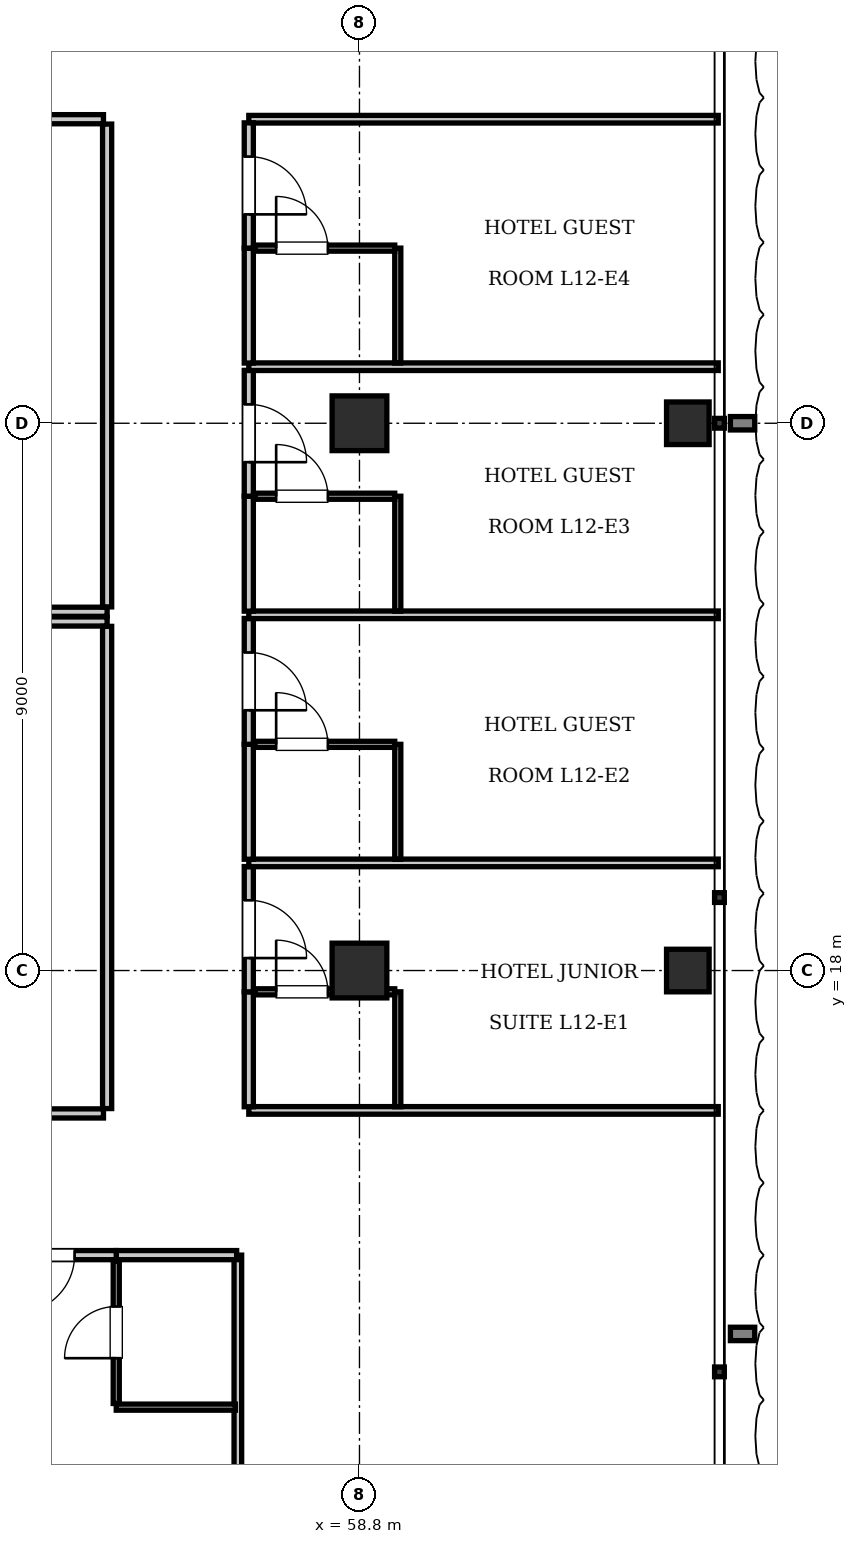
"""IFC4 building model, lengths in metres.
Left out: names, types, materials, properties, quantities, classifications, styles, units other than length and angle.
Written with IfcOpenShell. Run it as: python <this file> out.ifc"""

import sys

from ifc_helpers import new_model, si_unit, direction, frame, frame_2d, origin, origin_2d, place, context, subcontext, project, spatial, rectangle, i_section, extrude, element, fill, save


model = new_model("IFC4")
c1 = context("Model", 3, precision=1e-05, world=origin(), true_north=direction((0.0, 1.0)))
c2 = subcontext(c1, "Body", "Model", "MODEL_VIEW")
j1 = project(units=[si_unit("LENGTHUNIT", "METRE"), si_unit("PLANEANGLEUNIT", "RADIAN")], contexts=[c1])
p1 = place(None, origin())
s1 = spatial("IfcSite", under=j1, at=p1, CompositionType="ELEMENT")
p2 = place(p1, origin())
s2 = spatial("IfcBuilding", under=s1, at=p2, CompositionType="ELEMENT")
p3 = place(p2, frame((0.0, 0.0, 53.9)))
s3 = spatial("IfcBuildingStorey", under=s2, at=p3, CompositionType="ELEMENT", Elevation=53.9)
for number, where, z_axis, x_axis in (
    (1, (58.8, 18.0, 0.0), (0.0, 0.0, 1.0), (1.0, 0.0, 0.0)),
    (2, (58.8, 27.0, 0.0), (0.0, 0.0, 1.0), (1.0, 0.0, 0.0)),
):
    element("IfcColumn", number, at=place(p3, frame(where, z_axis=z_axis, x_axis=x_axis)), inside=s3, PredefinedType="COLUMN", context=c2, shape_type="SweptSolid", body=[
        extrude(rectangle(XDim=0.9, YDim=0.9, at=origin_2d()), origin(), (0.0, 0.0, 1.0), 3.85),
    ])
for number, where, z_axis, x_axis in (
    (3, (64.2, 18.0, 0.0), (0.0, 0.0, 1.0), (1.0, 0.0, 0.0)),
    (4, (64.2, 27.0, 0.0), (0.0, 0.0, 1.0), (1.0, 0.0, 0.0)),
):
    element("IfcColumn", number, at=place(p3, frame(where, z_axis=z_axis, x_axis=x_axis)), inside=s3, PredefinedType="COLUMN", context=c2, shape_type="SweptSolid", body=[
        extrude(i_section(OverallWidth=0.7, OverallDepth=0.7, WebThickness=0.028, FlangeThickness=0.044, at=origin_2d()), origin(), (0.0, 0.0, 1.0), 3.85),
    ])
p4 = place(p3, frame((20.95, 23.9, 0.0), z_axis=(0.0, 0.0, 1.0), x_axis=(1.0, 0.0, 0.0)))
e5 = element("IfcWall", 5, at=p4, inside=s3, PredefinedType="PARTITIONING", context=c2, shape_type="SweptSolid", body=[
    extrude(rectangle(XDim=33.7, YDim=0.15, at=frame_2d((16.85, 0.0))), origin(), (0.0, 0.0, 1.0), 3.61),
])
p5 = place(p3, frame((54.65, 23.98, 0.0), z_axis=(0.0, 0.0, 1.0), x_axis=(0.0, 1.0, 0.0)))
e6 = element("IfcWall", 6, at=p5, inside=s3, PredefinedType="PARTITIONING", context=c2, shape_type="SweptSolid", body=[
    extrude(rectangle(XDim=7.94, YDim=0.15, at=frame_2d((3.97, 0.0))), origin(), (0.0, 0.0, 1.0), 3.255),
])
p6 = place(p3, frame((43.222, 32.0, 0.0), z_axis=(0.0, 0.0, 1.0), x_axis=(1.0, 0.0, 0.0)))
e7 = element("IfcWall", 7, at=p6, inside=s3, PredefinedType="PARTITIONING", context=c2, shape_type="SweptSolid", body=[
    extrude(rectangle(XDim=11.368, YDim=0.15, at=frame_2d((5.684, 0.0))), origin(), (0.0, 0.0, 1.0), 3.61),
])
p7 = place(p6, frame((5.234, 0.0, 0.0)))
e8 = element("IfcOpeningElement", 8, at=p7, cuts=e7, PredefinedType="OPENING", context=c2, shape_type="SweptSolid", body=[
    extrude(rectangle(XDim=0.9, YDim=2.1, at=frame_2d((0.45, 1.05))), frame((0.0, 0.085, 0.0), z_axis=(0.0, -1.0, 0.0), x_axis=(1.0, 0.0, 0.0)), (0.0, 0.0, 1.0), 0.17),
])
p8 = place(p3, frame((20.95, 23.74, 0.0), z_axis=(0.0, 0.0, 1.0), x_axis=(1.0, 0.0, 0.0)))
e9 = element("IfcWall", 9, at=p8, inside=s3, PredefinedType="PARTITIONING", context=c2, shape_type="SweptSolid", body=[
    extrude(rectangle(XDim=33.7, YDim=0.15, at=frame_2d((16.85, 0.0))), origin(), (0.0, 0.0, 1.0), 3.61),
])
p9 = place(p3, frame((54.65, 15.73, 0.0), z_axis=(0.0, 0.0, 1.0), x_axis=(0.0, 1.0, 0.0)))
e10 = element("IfcWall", 10, at=p9, inside=s3, PredefinedType="PARTITIONING", context=c2, shape_type="SweptSolid", body=[
    extrude(rectangle(XDim=7.93, YDim=0.15, at=frame_2d((3.965, 0.0))), origin(), (0.0, 0.0, 1.0), 3.207),
])
p10 = place(p3, frame((40.189, 15.65, 0.0), z_axis=(0.0, 0.0, 1.0), x_axis=(1.0, 0.0, 0.0)))
e11 = element("IfcWall", 11, at=p10, inside=s3, PredefinedType="PARTITIONING", context=c2, shape_type="SweptSolid", body=[
    extrude(rectangle(XDim=14.401, YDim=0.15, at=frame_2d((7.201, 0.0))), origin(), (0.0, 0.0, 1.0), 3.61),
])
p11 = place(p10, frame((6.75, 0.0, 0.0)))
e12 = element("IfcOpeningElement", 12, at=p11, cuts=e11, PredefinedType="OPENING", context=c2, shape_type="SweptSolid", body=[
    extrude(rectangle(XDim=0.9, YDim=2.1, at=frame_2d((0.45, 1.05))), frame((0.0, 0.085, 0.0), z_axis=(0.0, -1.0, 0.0), x_axis=(1.0, 0.0, 0.0)), (0.0, 0.0, 1.0), 0.17),
])
p12 = place(p3, frame((56.8, 0.1, 0.0), z_axis=(0.0, 0.0, 1.0), x_axis=(0.0, 1.0, 0.0)))
e13 = element("IfcWall", 13, at=p12, inside=s3, PredefinedType="PARTITIONING", context=c2, shape_type="SweptSolid", body=[
    extrude(rectangle(XDim=13.22, YDim=0.125, at=frame_2d((6.61, 0.0))), origin(), (0.0, 0.0, 1.0), 3.61),
])
p13 = place(p3, frame((54.8, 13.32, 0.0), z_axis=(0.0, 0.0, 1.0), x_axis=(1.0, 0.0, 0.0)))
e14 = element("IfcWall", 14, at=p13, inside=s3, PredefinedType="PARTITIONING", context=c2, shape_type="SweptSolid", body=[
    extrude(rectangle(XDim=1.98, YDim=0.15, at=frame_2d((0.99, 0.0))), origin(), (0.0, 0.0, 1.0), 3.61),
])
p14 = place(p3, frame((54.8, 10.82, 0.0), z_axis=(0.0, 0.0, 1.0), x_axis=(1.0, 0.0, 0.0)))
e15 = element("IfcWall", 15, at=p14, inside=s3, PredefinedType="PARTITIONING", context=c2, shape_type="SweptSolid", body=[
    extrude(rectangle(XDim=1.96, YDim=0.1, at=frame_2d((0.98, 0.0))), origin(), (0.0, 0.0, 1.0), 3.61),
])
p15 = place(p3, frame((54.8, 10.88, 0.0), z_axis=(0.0, 0.0, 1.0), x_axis=(0.0, 1.0, 0.0)))
e16 = element("IfcWall", 16, at=p15, inside=s3, PredefinedType="PARTITIONING", context=c2, shape_type="SweptSolid", body=[
    extrude(rectangle(XDim=2.34, YDim=0.1, at=frame_2d((1.17, 0.0))), origin(), (0.0, 0.0, 1.0), 3.61),
])
p16 = place(p15, frame((0.745, 0.0, 0.0)))
e17 = element("IfcOpeningElement", 17, at=p16, cuts=e16, PredefinedType="OPENING", context=c2, shape_type="SweptSolid", body=[
    extrude(rectangle(XDim=0.85, YDim=2.1, at=frame_2d((0.425, 1.05))), frame((0.0, 0.06, 0.0), z_axis=(0.0, -1.0, 0.0), x_axis=(1.0, 0.0, 0.0)), (0.0, 0.0, 1.0), 0.12),
])
p17 = place(p3, frame((52.48, 13.32, 0.0), z_axis=(0.0, 0.0, 1.0), x_axis=(1.0, 0.0, 0.0)))
e18 = element("IfcWall", 18, at=p17, inside=s3, PredefinedType="PARTITIONING", context=c2, shape_type="SweptSolid", body=[
    extrude(rectangle(XDim=2.32, YDim=0.15, at=frame_2d((1.16, 0.0))), origin(), (0.0, 0.0, 1.0), 3.61),
])
p18 = place(p17, frame((0.685, 0.0, 0.0)))
e19 = element("IfcOpeningElement", 19, at=p18, cuts=e18, PredefinedType="OPENING", context=c2, shape_type="SweptSolid", body=[
    extrude(rectangle(XDim=0.95, YDim=2.15, at=frame_2d((0.475, 1.075))), frame((0.0, 0.085, 0.0), z_axis=(0.0, -1.0, 0.0), x_axis=(1.0, 0.0, 0.0)), (0.0, 0.0, 1.0), 0.17),
])
for number, where, z_axis, x_axis in (
    (20, (56.98, 15.7, 0.0), (0.0, 0.0, 1.0), (1.0, 0.0, 0.0)),
    (21, (56.98, 32.0, 0.0), (0.0, 0.0, 1.0), (1.0, 0.0, 0.0)),
):
    element("IfcWall", number, at=place(p3, frame(where, z_axis=z_axis, x_axis=x_axis)), inside=s3, PredefinedType="PARTITIONING", context=c2, shape_type="SweptSolid", body=[
        extrude(rectangle(XDim=7.72, YDim=0.125, at=frame_2d((3.86, 0.0))), origin(), (0.0, 0.0, 1.0), 3.61),
    ])
p19 = place(p3, frame((56.98, 15.76, 0.0), z_axis=(0.0, 0.0, 1.0), x_axis=(0.0, 1.0, 0.0)))
e22 = element("IfcWall", 22, at=p19, inside=s3, PredefinedType="PARTITIONING", context=c2, shape_type="SweptSolid", body=[
    extrude(rectangle(XDim=1.89, YDim=0.15, at=frame_2d((0.945, 0.0))), origin(), (0.0, 0.0, 1.0), 3.61),
])
p20 = place(p3, frame((56.98, 17.65, 0.0), z_axis=(0.0, 0.0, 1.0), x_axis=(0.0, 1.0, 0.0)))
e23 = element("IfcWall", 23, at=p20, inside=s3, PredefinedType="PARTITIONING", context=c2, shape_type="SweptSolid", body=[
    extrude(rectangle(XDim=2.06, YDim=0.15, at=frame_2d((1.03, 0.0))), origin(), (0.0, 0.0, 1.0), 3.61),
])
p21 = place(p20, frame((0.555, 0.0, 0.0)))
e24 = element("IfcOpeningElement", 24, at=p21, cuts=e23, PredefinedType="OPENING", context=c2, shape_type="SweptSolid", body=[
    extrude(rectangle(XDim=0.95, YDim=2.15, at=frame_2d((0.475, 1.075))), frame((0.0, 0.085, 0.0), z_axis=(0.0, -1.0, 0.0), x_axis=(1.0, 0.0, 0.0)), (0.0, 0.0, 1.0), 0.17),
])
p22 = place(p3, frame((59.43, 15.76, 0.0), z_axis=(0.0, 0.0, 1.0), x_axis=(0.0, 1.0, 0.0)))
e25 = element("IfcWall", 25, at=p22, inside=s3, PredefinedType="PARTITIONING", context=c2, shape_type="SweptSolid", body=[
    extrude(rectangle(XDim=1.89, YDim=0.1, at=frame_2d((0.945, 0.0))), origin(), (0.0, 0.0, 1.0), 3.61),
])
p23 = place(p3, frame((57.08, 17.65, 0.0), z_axis=(0.0, 0.0, 1.0), x_axis=(1.0, 0.0, 0.0)))
e26 = element("IfcWall", 26, at=p23, inside=s3, PredefinedType="PARTITIONING", context=c2, shape_type="SweptSolid", body=[
    extrude(rectangle(XDim=2.3, YDim=0.1, at=frame_2d((1.15, 0.0))), origin(), (0.0, 0.0, 1.0), 3.61),
])
p24 = place(p23, frame((0.35, 0.0, 0.0)))
e27 = element("IfcOpeningElement", 27, at=p24, cuts=e26, PredefinedType="OPENING", context=c2, shape_type="SweptSolid", body=[
    extrude(rectangle(XDim=0.85, YDim=2.1, at=frame_2d((0.425, 1.05))), frame((0.0, 0.06, 0.0), z_axis=(0.0, -1.0, 0.0), x_axis=(1.0, 0.0, 0.0)), (0.0, 0.0, 1.0), 0.12),
])
p25 = place(p3, frame((56.98, 19.77, 0.0), z_axis=(0.0, 0.0, 1.0), x_axis=(1.0, 0.0, 0.0)))
e28 = element("IfcWall", 28, at=p25, inside=s3, PredefinedType="PARTITIONING", context=c2, shape_type="SweptSolid", body=[
    extrude(rectangle(XDim=7.72, YDim=0.125, at=frame_2d((3.86, 0.0))), origin(), (0.0, 0.0, 1.0), 3.61),
])
p26 = place(p3, frame((56.98, 19.83, 0.0), z_axis=(0.0, 0.0, 1.0), x_axis=(0.0, 1.0, 0.0)))
e29 = element("IfcWall", 29, at=p26, inside=s3, PredefinedType="PARTITIONING", context=c2, shape_type="SweptSolid", body=[
    extrude(rectangle(XDim=1.89, YDim=0.15, at=frame_2d((0.945, 0.0))), origin(), (0.0, 0.0, 1.0), 3.61),
])
p27 = place(p3, frame((56.98, 21.72, 0.0), z_axis=(0.0, 0.0, 1.0), x_axis=(0.0, 1.0, 0.0)))
e30 = element("IfcWall", 30, at=p27, inside=s3, PredefinedType="PARTITIONING", context=c2, shape_type="SweptSolid", body=[
    extrude(rectangle(XDim=2.07, YDim=0.15, at=frame_2d((1.035, 0.0))), origin(), (0.0, 0.0, 1.0), 3.61),
])
p28 = place(p27, frame((0.56, 0.0, 0.0)))
e31 = element("IfcOpeningElement", 31, at=p28, cuts=e30, PredefinedType="OPENING", context=c2, shape_type="SweptSolid", body=[
    extrude(rectangle(XDim=0.95, YDim=2.15, at=frame_2d((0.475, 1.075))), frame((0.0, 0.085, 0.0), z_axis=(0.0, -1.0, 0.0), x_axis=(1.0, 0.0, 0.0)), (0.0, 0.0, 1.0), 0.17),
])
p29 = place(p3, frame((59.43, 19.83, 0.0), z_axis=(0.0, 0.0, 1.0), x_axis=(0.0, 1.0, 0.0)))
e32 = element("IfcWall", 32, at=p29, inside=s3, PredefinedType="PARTITIONING", context=c2, shape_type="SweptSolid", body=[
    extrude(rectangle(XDim=1.89, YDim=0.1, at=frame_2d((0.945, 0.0))), origin(), (0.0, 0.0, 1.0), 3.61),
])
p30 = place(p3, frame((57.08, 21.72, 0.0), z_axis=(0.0, 0.0, 1.0), x_axis=(1.0, 0.0, 0.0)))
e33 = element("IfcWall", 33, at=p30, inside=s3, PredefinedType="PARTITIONING", context=c2, shape_type="SweptSolid", body=[
    extrude(rectangle(XDim=2.3, YDim=0.1, at=frame_2d((1.15, 0.0))), origin(), (0.0, 0.0, 1.0), 3.61),
])
p31 = place(p30, frame((0.35, 0.0, 0.0)))
e34 = element("IfcOpeningElement", 34, at=p31, cuts=e33, PredefinedType="OPENING", context=c2, shape_type="SweptSolid", body=[
    extrude(rectangle(XDim=0.85, YDim=2.1, at=frame_2d((0.425, 1.05))), frame((0.0, 0.06, 0.0), z_axis=(0.0, -1.0, 0.0), x_axis=(1.0, 0.0, 0.0)), (0.0, 0.0, 1.0), 0.12),
])
p32 = place(p3, frame((56.98, 23.85, 0.0), z_axis=(0.0, 0.0, 1.0), x_axis=(1.0, 0.0, 0.0)))
e35 = element("IfcWall", 35, at=p32, inside=s3, PredefinedType="PARTITIONING", context=c2, shape_type="SweptSolid", body=[
    extrude(rectangle(XDim=7.72, YDim=0.125, at=frame_2d((3.86, 0.0))), origin(), (0.0, 0.0, 1.0), 3.61),
])
p33 = place(p3, frame((56.98, 23.91, 0.0), z_axis=(0.0, 0.0, 1.0), x_axis=(0.0, 1.0, 0.0)))
e36 = element("IfcWall", 36, at=p33, inside=s3, PredefinedType="PARTITIONING", context=c2, shape_type="SweptSolid", body=[
    extrude(rectangle(XDim=1.89, YDim=0.15, at=frame_2d((0.945, 0.0))), origin(), (0.0, 0.0, 1.0), 3.61),
])
p34 = place(p3, frame((56.98, 25.8, 0.0), z_axis=(0.0, 0.0, 1.0), x_axis=(0.0, 1.0, 0.0)))
e37 = element("IfcWall", 37, at=p34, inside=s3, PredefinedType="PARTITIONING", context=c2, shape_type="SweptSolid", body=[
    extrude(rectangle(XDim=2.07, YDim=0.15, at=frame_2d((1.035, 0.0))), origin(), (0.0, 0.0, 1.0), 3.61),
])
p35 = place(p34, frame((0.56, 0.0, 0.0)))
e38 = element("IfcOpeningElement", 38, at=p35, cuts=e37, PredefinedType="OPENING", context=c2, shape_type="SweptSolid", body=[
    extrude(rectangle(XDim=0.95, YDim=2.15, at=frame_2d((0.475, 1.075))), frame((0.0, 0.085, 0.0), z_axis=(0.0, -1.0, 0.0), x_axis=(1.0, 0.0, 0.0)), (0.0, 0.0, 1.0), 0.17),
])
p36 = place(p3, frame((59.43, 23.91, 0.0), z_axis=(0.0, 0.0, 1.0), x_axis=(0.0, 1.0, 0.0)))
e39 = element("IfcWall", 39, at=p36, inside=s3, PredefinedType="PARTITIONING", context=c2, shape_type="SweptSolid", body=[
    extrude(rectangle(XDim=1.89, YDim=0.1, at=frame_2d((0.945, 0.0))), origin(), (0.0, 0.0, 1.0), 3.61),
])
p37 = place(p3, frame((57.08, 25.8, 0.0), z_axis=(0.0, 0.0, 1.0), x_axis=(1.0, 0.0, 0.0)))
e40 = element("IfcWall", 40, at=p37, inside=s3, PredefinedType="PARTITIONING", context=c2, shape_type="SweptSolid", body=[
    extrude(rectangle(XDim=2.3, YDim=0.1, at=frame_2d((1.15, 0.0))), origin(), (0.0, 0.0, 1.0), 3.61),
])
p38 = place(p37, frame((0.35, 0.0, 0.0)))
e41 = element("IfcOpeningElement", 41, at=p38, cuts=e40, PredefinedType="OPENING", context=c2, shape_type="SweptSolid", body=[
    extrude(rectangle(XDim=0.85, YDim=2.1, at=frame_2d((0.425, 1.05))), frame((0.0, 0.06, 0.0), z_axis=(0.0, -1.0, 0.0), x_axis=(1.0, 0.0, 0.0)), (0.0, 0.0, 1.0), 0.12),
])
p39 = place(p3, frame((56.98, 27.93, 0.0), z_axis=(0.0, 0.0, 1.0), x_axis=(1.0, 0.0, 0.0)))
e42 = element("IfcWall", 42, at=p39, inside=s3, PredefinedType="PARTITIONING", context=c2, shape_type="SweptSolid", body=[
    extrude(rectangle(XDim=7.72, YDim=0.125, at=frame_2d((3.86, 0.0))), origin(), (0.0, 0.0, 1.0), 3.61),
])
p40 = place(p3, frame((56.98, 27.99, 0.0), z_axis=(0.0, 0.0, 1.0), x_axis=(0.0, 1.0, 0.0)))
e43 = element("IfcWall", 43, at=p40, inside=s3, PredefinedType="PARTITIONING", context=c2, shape_type="SweptSolid", body=[
    extrude(rectangle(XDim=1.89, YDim=0.15, at=frame_2d((0.945, 0.0))), origin(), (0.0, 0.0, 1.0), 3.61),
])
p41 = place(p3, frame((56.98, 29.88, 0.0), z_axis=(0.0, 0.0, 1.0), x_axis=(0.0, 1.0, 0.0)))
e44 = element("IfcWall", 44, at=p41, inside=s3, PredefinedType="PARTITIONING", context=c2, shape_type="SweptSolid", body=[
    extrude(rectangle(XDim=2.06, YDim=0.15, at=frame_2d((1.03, 0.0))), origin(), (0.0, 0.0, 1.0), 3.61),
])
p42 = place(p41, frame((0.555, 0.0, 0.0)))
e45 = element("IfcOpeningElement", 45, at=p42, cuts=e44, PredefinedType="OPENING", context=c2, shape_type="SweptSolid", body=[
    extrude(rectangle(XDim=0.95, YDim=2.15, at=frame_2d((0.475, 1.075))), frame((0.0, 0.085, 0.0), z_axis=(0.0, -1.0, 0.0), x_axis=(1.0, 0.0, 0.0)), (0.0, 0.0, 1.0), 0.17),
])
p43 = place(p3, frame((59.43, 27.99, 0.0), z_axis=(0.0, 0.0, 1.0), x_axis=(0.0, 1.0, 0.0)))
e46 = element("IfcWall", 46, at=p43, inside=s3, PredefinedType="PARTITIONING", context=c2, shape_type="SweptSolid", body=[
    extrude(rectangle(XDim=1.89, YDim=0.1, at=frame_2d((0.945, 0.0))), origin(), (0.0, 0.0, 1.0), 3.61),
])
p44 = place(p3, frame((57.08, 29.88, 0.0), z_axis=(0.0, 0.0, 1.0), x_axis=(1.0, 0.0, 0.0)))
e47 = element("IfcWall", 47, at=p44, inside=s3, PredefinedType="PARTITIONING", context=c2, shape_type="SweptSolid", body=[
    extrude(rectangle(XDim=2.3, YDim=0.1, at=frame_2d((1.15, 0.0))), origin(), (0.0, 0.0, 1.0), 3.61),
])
p45 = place(p44, frame((0.35, 0.0, 0.0)))
e48 = element("IfcOpeningElement", 48, at=p45, cuts=e47, PredefinedType="OPENING", context=c2, shape_type="SweptSolid", body=[
    extrude(rectangle(XDim=0.85, YDim=2.1, at=frame_2d((0.425, 1.05))), frame((0.0, 0.06, 0.0), z_axis=(0.0, -1.0, 0.0), x_axis=(1.0, 0.0, 0.0)), (0.0, 0.0, 1.0), 0.12),
])
p46 = place(p16, origin())
e49 = element("IfcDoor", 49, at=p46, inside=s3, OperationType="SINGLE_SWING_LEFT", PredefinedType="DOOR", context=c2, shape_type="SweptSolid", body=[
    extrude(rectangle(XDim=0.85, YDim=2.1, at=frame_2d((0.425, 1.05))), frame((0.0, 0.025, 0.0), z_axis=(0.0, -1.0, 0.0), x_axis=(1.0, 0.0, 0.0)), (0.0, 0.0, 1.0), 0.05),
])
fill(e17, e49)
p47 = place(p18, frame((0.95, 0.0, 0.0), z_axis=(0.0, 0.0, 1.0), x_axis=(-1.0, 0.0, 0.0)))
e50 = element("IfcDoor", 50, at=p47, inside=s3, OperationType="SINGLE_SWING_RIGHT", PredefinedType="DOOR", context=c2, shape_type="SweptSolid", body=[
    extrude(rectangle(XDim=0.95, YDim=2.15, at=frame_2d((0.475, 1.075))), frame((0.0, 0.025, 0.0), z_axis=(0.0, -1.0, 0.0), x_axis=(1.0, 0.0, 0.0)), (0.0, 0.0, 1.0), 0.05),
])
fill(e19, e50)
p48 = place(p24, origin())
e51 = element("IfcDoor", 51, at=p48, inside=s3, OperationType="SINGLE_SWING_LEFT", PredefinedType="DOOR", context=c2, shape_type="SweptSolid", body=[
    extrude(rectangle(XDim=0.85, YDim=2.1, at=frame_2d((0.425, 1.05))), frame((0.0, 0.025, 0.0), z_axis=(0.0, -1.0, 0.0), x_axis=(1.0, 0.0, 0.0)), (0.0, 0.0, 1.0), 0.05),
])
fill(e27, e51)
p49 = place(p21, frame((0.95, 0.0, 0.0), z_axis=(0.0, 0.0, 1.0), x_axis=(-1.0, 0.0, 0.0)))
e52 = element("IfcDoor", 52, at=p49, inside=s3, OperationType="SINGLE_SWING_RIGHT", PredefinedType="DOOR", context=c2, shape_type="SweptSolid", body=[
    extrude(rectangle(XDim=0.95, YDim=2.15, at=frame_2d((0.475, 1.075))), frame((0.0, 0.025, 0.0), z_axis=(0.0, -1.0, 0.0), x_axis=(1.0, 0.0, 0.0)), (0.0, 0.0, 1.0), 0.05),
])
fill(e24, e52)
p50 = place(p31, origin())
e53 = element("IfcDoor", 53, at=p50, inside=s3, OperationType="SINGLE_SWING_LEFT", PredefinedType="DOOR", context=c2, shape_type="SweptSolid", body=[
    extrude(rectangle(XDim=0.85, YDim=2.1, at=frame_2d((0.425, 1.05))), frame((0.0, 0.025, 0.0), z_axis=(0.0, -1.0, 0.0), x_axis=(1.0, 0.0, 0.0)), (0.0, 0.0, 1.0), 0.05),
])
fill(e34, e53)
p51 = place(p28, frame((0.95, 0.0, 0.0), z_axis=(0.0, 0.0, 1.0), x_axis=(-1.0, 0.0, 0.0)))
e54 = element("IfcDoor", 54, at=p51, inside=s3, OperationType="SINGLE_SWING_RIGHT", PredefinedType="DOOR", context=c2, shape_type="SweptSolid", body=[
    extrude(rectangle(XDim=0.95, YDim=2.15, at=frame_2d((0.475, 1.075))), frame((0.0, 0.025, 0.0), z_axis=(0.0, -1.0, 0.0), x_axis=(1.0, 0.0, 0.0)), (0.0, 0.0, 1.0), 0.05),
])
fill(e31, e54)
p52 = place(p38, origin())
e55 = element("IfcDoor", 55, at=p52, inside=s3, OperationType="SINGLE_SWING_LEFT", PredefinedType="DOOR", context=c2, shape_type="SweptSolid", body=[
    extrude(rectangle(XDim=0.85, YDim=2.1, at=frame_2d((0.425, 1.05))), frame((0.0, 0.025, 0.0), z_axis=(0.0, -1.0, 0.0), x_axis=(1.0, 0.0, 0.0)), (0.0, 0.0, 1.0), 0.05),
])
fill(e41, e55)
p53 = place(p35, frame((0.95, 0.0, 0.0), z_axis=(0.0, 0.0, 1.0), x_axis=(-1.0, 0.0, 0.0)))
e56 = element("IfcDoor", 56, at=p53, inside=s3, OperationType="SINGLE_SWING_RIGHT", PredefinedType="DOOR", context=c2, shape_type="SweptSolid", body=[
    extrude(rectangle(XDim=0.95, YDim=2.15, at=frame_2d((0.475, 1.075))), frame((0.0, 0.025, 0.0), z_axis=(0.0, -1.0, 0.0), x_axis=(1.0, 0.0, 0.0)), (0.0, 0.0, 1.0), 0.05),
])
fill(e38, e56)
p54 = place(p45, origin())
e57 = element("IfcDoor", 57, at=p54, inside=s3, OperationType="SINGLE_SWING_LEFT", PredefinedType="DOOR", context=c2, shape_type="SweptSolid", body=[
    extrude(rectangle(XDim=0.85, YDim=2.1, at=frame_2d((0.425, 1.05))), frame((0.0, 0.025, 0.0), z_axis=(0.0, -1.0, 0.0), x_axis=(1.0, 0.0, 0.0)), (0.0, 0.0, 1.0), 0.05),
])
fill(e48, e57)
p55 = place(p42, frame((0.95, 0.0, 0.0), z_axis=(0.0, 0.0, 1.0), x_axis=(-1.0, 0.0, 0.0)))
e58 = element("IfcDoor", 58, at=p55, inside=s3, OperationType="SINGLE_SWING_RIGHT", PredefinedType="DOOR", context=c2, shape_type="SweptSolid", body=[
    extrude(rectangle(XDim=0.95, YDim=2.15, at=frame_2d((0.475, 1.075))), frame((0.0, 0.025, 0.0), z_axis=(0.0, -1.0, 0.0), x_axis=(1.0, 0.0, 0.0)), (0.0, 0.0, 1.0), 0.05),
])
fill(e45, e58)
save(model, sys.argv[1])
